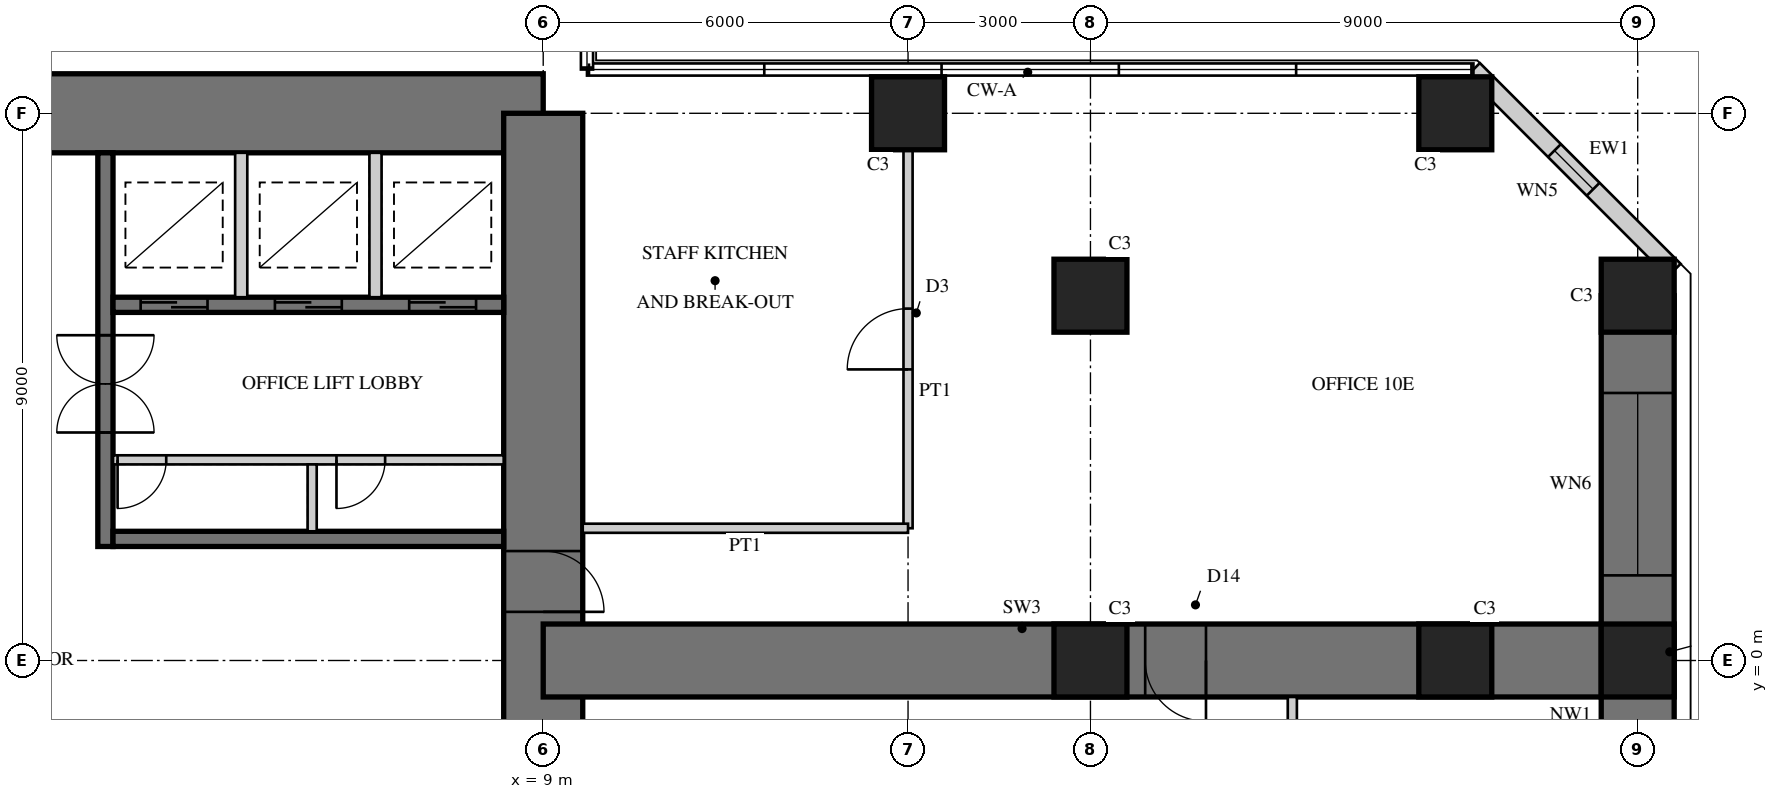
"""IFC4 building model, lengths in metres.
Left out: names, types, materials, properties, quantities, classifications, styles, units other than length and angle.
Written with IfcOpenShell. Run it as: python <this file> out.ifc"""

import sys

from ifc_helpers import new_model, si_unit, direction, frame, frame_2d, origin, origin_2d, place, context, subcontext, project, spatial, rectangle, hollow_rectangle, extrude, element, fill, save


model = new_model("IFC4")
c1 = context("Model", 3, precision=1e-05, world=origin(), true_north=direction((0.0, 1.0)))
c2 = subcontext(c1, "Body", "Model", "MODEL_VIEW")
j1 = project(units=[si_unit("LENGTHUNIT", "METRE"), si_unit("PLANEANGLEUNIT", "RADIAN")], contexts=[c1])
p1 = place(None, origin())
s1 = spatial("IfcSite", under=j1, at=p1, CompositionType="ELEMENT")
p2 = place(p1, origin())
s2 = spatial("IfcBuilding", under=s1, at=p2, CompositionType="ELEMENT")
p3 = place(p2, frame((0.0, 0.0, 43.5)))
s3 = spatial("IfcBuildingStorey", under=s2, at=p3, CompositionType="ELEMENT", Elevation=43.5)
p4 = place(p3, frame((9.0, 9.0, 0.0), z_axis=(0.0, 0.0, 1.0), x_axis=(-1.0, 0.0, 0.0)))
e1 = element("IfcWall", 1, at=p4, inside=s3, PredefinedType="SHEAR", context=c2, shape_type="SweptSolid", body=[
    extrude(rectangle(XDim=18.0, YDim=1.3, at=frame_2d((9.0, 0.0))), origin(), (0.0, 0.0, 1.0), 4.0),
])
p5 = place(p4, frame((9.8, 0.0, 0.0)))
e2 = element("IfcOpeningElement", 2, at=p5, cuts=e1, PredefinedType="OPENING", context=c2, shape_type="SweptSolid", body=[
    extrude(rectangle(XDim=1.0, YDim=2.4, at=frame_2d((0.5, 1.2))), frame((0.0, 0.66, 0.0), z_axis=(0.0, -1.0, 0.0), x_axis=(1.0, 0.0, 0.0)), (0.0, 0.0, 1.0), 1.32),
])
p6 = place(p3, frame((9.0, -9.0, 0.0), z_axis=(0.0, 0.0, 1.0), x_axis=(0.0, 1.0, 0.0)))
e3 = element("IfcWall", 3, at=p6, inside=s3, PredefinedType="SHEAR", context=c2, shape_type="SweptSolid", body=[
    extrude(rectangle(XDim=18.0, YDim=1.3, at=frame_2d((9.0, 0.0))), origin(), (0.0, 0.0, 1.0), 4.0),
])
p7 = place(p6, frame((9.8, 0.0, 0.0)))
e4 = element("IfcOpeningElement", 4, at=p7, cuts=e3, PredefinedType="OPENING", context=c2, shape_type="SweptSolid", body=[
    extrude(rectangle(XDim=1.0, YDim=2.4, at=frame_2d((0.5, 1.2))), frame((0.0, 0.66, 0.0), z_axis=(0.0, -1.0, 0.0), x_axis=(1.0, 0.0, 0.0)), (0.0, 0.0, 1.0), 1.32),
])
p8 = place(p3, frame((1.8, 1.875, 0.0), z_axis=(0.0, 0.0, 1.0), x_axis=(0.0, 1.0, 0.0)))
e5 = element("IfcWall", 5, at=p8, inside=s3, PredefinedType="SHEAR", context=c2, shape_type="SweptSolid", body=[
    extrude(rectangle(XDim=6.475, YDim=0.25, at=frame_2d((3.238, 0.0))), origin(), (0.0, 0.0, 1.0), 4.0),
])
p9 = place(p8, frame((1.875, 0.0, 0.0)))
e6 = element("IfcOpeningElement", 6, at=p9, cuts=e5, PredefinedType="OPENING", context=c2, shape_type="SweptSolid", body=[
    extrude(rectangle(XDim=1.6, YDim=2.4, at=frame_2d((0.8, 1.2))), frame((0.0, 0.135, 0.0), z_axis=(0.0, -1.0, 0.0), x_axis=(1.0, 0.0, 0.0)), (0.0, 0.0, 1.0), 0.27),
])
p10 = place(p3, frame((1.925, 2.0, 0.0), z_axis=(0.0, 0.0, 1.0), x_axis=(1.0, 0.0, 0.0)))
e7 = element("IfcWall", 7, at=p10, inside=s3, PredefinedType="SHEAR", context=c2, shape_type="SweptSolid", body=[
    extrude(rectangle(XDim=6.425, YDim=0.25, at=frame_2d((3.212, 0.0))), origin(), (0.0, 0.0, 1.0), 4.0),
])
p11 = place(p3, frame((1.925, 5.85, 0.0), z_axis=(0.0, 0.0, 1.0), x_axis=(1.0, 0.0, 0.0)))
e8 = element("IfcWall", 8, at=p11, inside=s3, PredefinedType="SHEAR", context=c2, shape_type="SweptSolid", body=[
    extrude(rectangle(XDim=6.425, YDim=0.25, at=frame_2d((3.212, 0.0))), origin(), (0.0, 0.0, 1.0), 4.0),
])
p12 = place(p11, frame((0.454, 0.0, 0.0)))
e9 = element("IfcOpeningElement", 9, at=p12, cuts=e8, PredefinedType="OPENING", context=c2, shape_type="SweptSolid", body=[
    extrude(rectangle(XDim=1.1, YDim=2.2, at=frame_2d((0.55, 1.1))), frame((0.0, 0.135, 0.0), z_axis=(0.0, -1.0, 0.0), x_axis=(1.0, 0.0, 0.0)), (0.0, 0.0, 1.0), 0.27),
])
p13 = place(p11, frame((2.663, 0.0, 0.0)))
e10 = element("IfcOpeningElement", 10, at=p13, cuts=e8, PredefinedType="OPENING", context=c2, shape_type="SweptSolid", body=[
    extrude(rectangle(XDim=1.1, YDim=2.2, at=frame_2d((0.55, 1.1))), frame((0.0, 0.135, 0.0), z_axis=(0.0, -1.0, 0.0), x_axis=(1.0, 0.0, 0.0)), (0.0, 0.0, 1.0), 0.27),
])
p14 = place(p11, frame((4.871, 0.0, 0.0)))
e11 = element("IfcOpeningElement", 11, at=p14, cuts=e8, PredefinedType="OPENING", context=c2, shape_type="SweptSolid", body=[
    extrude(rectangle(XDim=1.1, YDim=2.2, at=frame_2d((0.55, 1.1))), frame((0.0, 0.135, 0.0), z_axis=(0.0, -1.0, 0.0), x_axis=(1.0, 0.0, 0.0)), (0.0, 0.0, 1.0), 0.27),
])
p15 = place(p3, frame((1.925, 3.3, 0.0), z_axis=(0.0, 0.0, 1.0), x_axis=(1.0, 0.0, 0.0)))
e12 = element("IfcWall", 12, at=p15, inside=s3, PredefinedType="PARTITIONING", context=c2, shape_type="SweptSolid", body=[
    extrude(rectangle(XDim=6.425, YDim=0.15, at=frame_2d((3.212, 0.0))), origin(), (0.0, 0.0, 1.0), 4.0),
])
p16 = place(p15, frame((0.075, 0.0, 0.0)))
e13 = element("IfcOpeningElement", 13, at=p16, cuts=e12, PredefinedType="OPENING", context=c2, shape_type="SweptSolid", body=[
    extrude(rectangle(XDim=0.8, YDim=2.1, at=frame_2d((0.4, 1.05))), frame((0.0, 0.085, 0.0), z_axis=(0.0, -1.0, 0.0), x_axis=(1.0, 0.0, 0.0)), (0.0, 0.0, 1.0), 0.17),
])
p17 = place(p15, frame((3.675, 0.0, 0.0)))
e14 = element("IfcOpeningElement", 14, at=p17, cuts=e12, PredefinedType="OPENING", context=c2, shape_type="SweptSolid", body=[
    extrude(rectangle(XDim=0.8, YDim=2.1, at=frame_2d((0.4, 1.05))), frame((0.0, 0.085, 0.0), z_axis=(0.0, -1.0, 0.0), x_axis=(1.0, 0.0, 0.0)), (0.0, 0.0, 1.0), 0.17),
])
p18 = place(p3, frame((5.2, 2.125, 0.0), z_axis=(0.0, 0.0, 1.0), x_axis=(0.0, 1.0, 0.0)))
e15 = element("IfcWall", 15, at=p18, inside=s3, PredefinedType="PARTITIONING", context=c2, shape_type="SweptSolid", body=[
    extrude(rectangle(XDim=1.1, YDim=0.15, at=frame_2d((0.55, 0.0))), origin(), (0.0, 0.0, 1.0), 4.0),
])
for number, where, z_axis, x_axis in (
    (16, (4.033, 5.975, 0.0), (0.0, 0.0, 1.0), (0.0, 1.0, 0.0)),
    (17, (6.242, 5.975, 0.0), (0.0, 0.0, 1.0), (0.0, 1.0, 0.0)),
):
    element("IfcWall", number, at=place(p3, frame(where, z_axis=z_axis, x_axis=x_axis)), inside=s3, PredefinedType="PARTITIONING", context=c2, shape_type="SweptSolid", body=[
        extrude(rectangle(XDim=2.375, YDim=0.2, at=frame_2d((1.188, 0.0))), origin(), (0.0, 0.0, 1.0), 4.0),
    ])
p19 = place(p3, frame((9.0, 0.0, 0.0), z_axis=(0.0, 0.0, 1.0), x_axis=(1.0, 0.0, 0.0)))
e18 = element("IfcWall", 18, at=p19, inside=s3, PredefinedType="SHEAR", context=c2, shape_type="SweptSolid", body=[
    extrude(rectangle(XDim=18.0, YDim=1.2, at=frame_2d((9.0, 0.0))), origin(), (0.0, 0.0, 1.0), 4.0),
])
p20 = place(p19, frame((9.9, 0.0, 0.0)))
e19 = element("IfcOpeningElement", 19, at=p20, cuts=e18, PredefinedType="OPENING", context=c2, shape_type="SweptSolid", body=[
    extrude(rectangle(XDim=1.0, YDim=2.2, at=frame_2d((0.5, 1.1))), frame((0.0, 0.61, 0.0), z_axis=(0.0, -1.0, 0.0), x_axis=(1.0, 0.0, 0.0)), (0.0, 0.0, 1.0), 1.22),
])
p21 = place(p3, frame((27.0, -6.0, 0.0), z_axis=(0.0, 0.0, 1.0), x_axis=(0.0, 1.0, 0.0)))
e20 = element("IfcWall", 20, at=p21, inside=s3, PredefinedType="SHEAR", context=c2, shape_type="SweptSolid", body=[
    extrude(rectangle(XDim=12.0, YDim=1.2, at=frame_2d((6.0, 0.0))), origin(), (0.0, 0.0, 1.0), 4.0),
])
p22 = place(p21, frame((1.6, 0.0, 0.6)))
e21 = element("IfcOpeningElement", 21, at=p22, cuts=e20, PredefinedType="OPENING", context=c2, shape_type="SweptSolid", body=[
    extrude(rectangle(XDim=3.0, YDim=2.4, at=frame_2d((1.5, 1.2))), frame((0.0, 0.61, 0.0), z_axis=(0.0, -1.0, 0.0), x_axis=(1.0, 0.0, 0.0)), (0.0, 0.0, 1.0), 1.22),
])
p23 = place(p21, frame((7.4, 0.0, 0.6)))
e22 = element("IfcOpeningElement", 22, at=p23, cuts=e20, PredefinedType="OPENING", context=c2, shape_type="SweptSolid", body=[
    extrude(rectangle(XDim=3.0, YDim=2.4, at=frame_2d((1.5, 1.2))), frame((0.0, 0.61, 0.0), z_axis=(0.0, -1.0, 0.0), x_axis=(1.0, 0.0, 0.0)), (0.0, 0.0, 1.0), 1.22),
])
for number, where, z_axis, x_axis in (
    (23, (15.0, 9.0, 0.0), (0.0, 0.0, 1.0), (1.0, 0.0, 0.0)),
    (24, (24.0, 9.0, 0.0), (0.0, 0.0, 1.0), (1.0, 0.0, 0.0)),
    (25, (27.0, 0.0, 0.0), (0.0, 0.0, 1.0), (1.0, 0.0, 0.0)),
    (26, (27.0, 6.0, 0.0), (0.0, 0.0, 1.0), (1.0, 0.0, 0.0)),
    (27, (18.0, 0.0, 0.0), (0.0, 0.0, 1.0), (1.0, 0.0, 0.0)),
    (28, (18.0, 6.0, 0.0), (0.0, 0.0, 1.0), (1.0, 0.0, 0.0)),
    (29, (24.0, 0.0, 0.0), (0.0, 0.0, 1.0), (1.0, 0.0, 0.0)),
):
    element("IfcColumn", number, at=place(p3, frame(where, z_axis=z_axis, x_axis=x_axis)), inside=s3, PredefinedType="COLUMN", context=c2, shape_type="SweptSolid", body=[
        extrude(rectangle(XDim=1.2, YDim=1.2, at=origin_2d()), origin(), (0.0, 0.0, 1.0), 4.0),
    ])
p24 = place(p3, frame((27.6, 6.418, 0.0), z_axis=(0.0, 0.0, 1.0), x_axis=(-0.707106781187, 0.707106781187, 0.0)))
e30 = element("IfcWall", 30, at=p24, inside=s3, PredefinedType="SOLIDWALL", context=c2, shape_type="SweptSolid", body=[
    extrude(rectangle(XDim=4.669, YDim=0.3, at=frame_2d((2.335, 0.0))), origin(), (0.0, 0.0, 1.0), 3.8),
])
p25 = place(p24, frame((1.885, 0.0, 0.3)))
e31 = element("IfcOpeningElement", 31, at=p25, cuts=e30, PredefinedType="OPENING", context=c2, shape_type="SweptSolid", body=[
    extrude(rectangle(XDim=0.9, YDim=2.4, at=frame_2d((0.45, 1.2))), frame((0.0, 0.16, 0.0), z_axis=(0.0, -1.0, 0.0), x_axis=(1.0, 0.0, 0.0)), (0.0, 0.0, 1.0), 0.32),
])
p26 = place(p3, frame((15.0, 2.175, 0.0), z_axis=(0.0, 0.0, 1.0), x_axis=(0.0, 1.0, 0.0)))
e32 = element("IfcWall", 32, at=p26, inside=s3, PredefinedType="PARTITIONING", context=c2, shape_type="SweptSolid", body=[
    extrude(rectangle(XDim=6.225, YDim=0.15, at=frame_2d((3.112, 0.0))), origin(), (0.0, 0.0, 1.0), 2.95),
])
p27 = place(p26, frame((2.613, 0.0, 0.0)))
e33 = element("IfcOpeningElement", 33, at=p27, cuts=e32, PredefinedType="OPENING", context=c2, shape_type="SweptSolid", body=[
    extrude(rectangle(XDim=1.0, YDim=2.1, at=frame_2d((0.5, 1.05))), frame((0.0, 0.085, 0.0), z_axis=(0.0, -1.0, 0.0), x_axis=(1.0, 0.0, 0.0)), (0.0, 0.0, 1.0), 0.17),
])
p28 = place(p3, frame((9.65, 2.175, 0.0), z_axis=(0.0, 0.0, 1.0), x_axis=(1.0, 0.0, 0.0)))
e34 = element("IfcWall", 34, at=p28, inside=s3, PredefinedType="PARTITIONING", context=c2, shape_type="SweptSolid", body=[
    extrude(rectangle(XDim=5.35, YDim=0.15, at=frame_2d((2.675, 0.0))), origin(), (0.0, 0.0, 1.0), 3.8),
])
p29 = place(p3, frame((21.32, -9.68, 0.0), z_axis=(0.0, 0.0, 1.0), x_axis=(0.0, 1.0, 0.0)))
e35 = element("IfcWall", 35, at=p29, inside=s3, PredefinedType="PARTITIONING", context=c2, shape_type="SweptSolid", body=[
    extrude(rectangle(XDim=9.08, YDim=0.15, at=frame_2d((4.54, 0.0))), origin(), (0.0, 0.0, 1.0), 3.8),
])
p30 = place(p29, frame((7.63, 0.0, 0.0)))
e36 = element("IfcOpeningElement", 36, at=p30, cuts=e35, PredefinedType="OPENING", context=c2, shape_type="SweptSolid", body=[
    extrude(rectangle(XDim=1.0, YDim=2.2, at=frame_2d((0.5, 1.1))), frame((0.0, 0.085, 0.0), z_axis=(0.0, -1.0, 0.0), x_axis=(1.0, 0.0, 0.0)), (0.0, 0.0, 1.0), 0.17),
])
p31 = place(p23, origin())
e37 = element("IfcWindow", 37, at=p31, inside=s3, PartitioningType="SINGLE_PANEL", PredefinedType="WINDOW", context=c2, shape_type="SweptSolid", body=[
    extrude(hollow_rectangle(XDim=3.0, YDim=2.4, WallThickness=0.06, at=frame_2d((1.5, 1.2))), frame((0.0, 0.03, 0.0), z_axis=(0.0, -1.0, 0.0), x_axis=(1.0, 0.0, 0.0)), (0.0, 0.0, 1.0), 0.06),
    extrude(rectangle(XDim=2.879, YDim=2.279, at=frame_2d((1.5, 1.2))), frame((0.0, 0.03, 0.0), z_axis=(0.0, -1.0, 0.0), x_axis=(1.0, 0.0, 0.0)), (0.0, 0.0, 1.0), 0.06),
])
fill(e22, e37)
p32 = place(p25, origin())
e38 = element("IfcWindow", 38, at=p32, inside=s3, PartitioningType="SINGLE_PANEL", PredefinedType="WINDOW", context=c2, shape_type="SweptSolid", body=[
    extrude(hollow_rectangle(XDim=0.9, YDim=2.4, WallThickness=0.06, at=frame_2d((0.45, 1.2))), frame((0.0, 0.03, 0.0), z_axis=(0.0, -1.0, 0.0), x_axis=(1.0, 0.0, 0.0)), (0.0, 0.0, 1.0), 0.06),
    extrude(rectangle(XDim=0.779, YDim=2.279, at=frame_2d((0.45, 1.2))), frame((0.0, 0.03, 0.0), z_axis=(0.0, -1.0, 0.0), x_axis=(1.0, 0.0, 0.0)), (0.0, 0.0, 1.0), 0.06),
])
fill(e31, e38)
p33 = place(p27, origin())
e39 = element("IfcDoor", 39, at=p33, inside=s3, OperationType="SINGLE_SWING_LEFT", PredefinedType="DOOR", context=c2, shape_type="SweptSolid", body=[
    extrude(rectangle(XDim=1.0, YDim=2.1, at=frame_2d((0.5, 1.05))), frame((0.0, 0.025, 0.0), z_axis=(0.0, -1.0, 0.0), x_axis=(1.0, 0.0, 0.0)), (0.0, 0.0, 1.0), 0.05),
])
fill(e33, e39)
p34 = place(p20, frame((1.0, 0.0, 0.0), z_axis=(0.0, 0.0, 1.0), x_axis=(-1.0, 0.0, 0.0)))
e40 = element("IfcDoor", 40, at=p34, inside=s3, OperationType="SINGLE_SWING_LEFT", PredefinedType="DOOR", context=c2, shape_type="SweptSolid", body=[
    extrude(rectangle(XDim=1.0, YDim=2.2, at=frame_2d((0.5, 1.1))), frame((0.0, 0.025, 0.0), z_axis=(0.0, -1.0, 0.0), x_axis=(1.0, 0.0, 0.0)), (0.0, 0.0, 1.0), 0.05),
])
fill(e19, e40)
p35 = place(p7, frame((1.0, 0.0, 0.0), z_axis=(0.0, 0.0, 1.0), x_axis=(-1.0, 0.0, 0.0)))
e41 = element("IfcDoor", 41, at=p35, inside=s3, OperationType="SINGLE_SWING_RIGHT", PredefinedType="DOOR", context=c2, shape_type="SweptSolid", body=[
    extrude(rectangle(XDim=1.0, YDim=2.4, at=frame_2d((0.5, 1.2))), frame((0.0, -0.005, 0.0), z_axis=(0.0, -1.0, 0.0), x_axis=(1.0, 0.0, 0.0)), (0.0, 0.0, 1.0), 0.05),
])
fill(e4, e41)
p36 = place(p12, origin())
e42 = element("IfcDoor", 42, at=p36, inside=s3, OperationType="DOUBLE_DOOR_SLIDING", PredefinedType="DOOR", context=c2, shape_type="SweptSolid", body=[
    extrude(rectangle(XDim=1.1, YDim=2.2, at=frame_2d((0.55, 1.1))), frame((0.0, 0.025, 0.0), z_axis=(0.0, -1.0, 0.0), x_axis=(1.0, 0.0, 0.0)), (0.0, 0.0, 1.0), 0.05),
])
fill(e9, e42)
p37 = place(p13, origin())
e43 = element("IfcDoor", 43, at=p37, inside=s3, OperationType="DOUBLE_DOOR_SLIDING", PredefinedType="DOOR", context=c2, shape_type="SweptSolid", body=[
    extrude(rectangle(XDim=1.1, YDim=2.2, at=frame_2d((0.55, 1.1))), frame((0.0, 0.025, 0.0), z_axis=(0.0, -1.0, 0.0), x_axis=(1.0, 0.0, 0.0)), (0.0, 0.0, 1.0), 0.05),
])
fill(e10, e43)
p38 = place(p14, origin())
e44 = element("IfcDoor", 44, at=p38, inside=s3, OperationType="DOUBLE_DOOR_SLIDING", PredefinedType="DOOR", context=c2, shape_type="SweptSolid", body=[
    extrude(rectangle(XDim=1.1, YDim=2.2, at=frame_2d((0.55, 1.1))), frame((0.0, 0.025, 0.0), z_axis=(0.0, -1.0, 0.0), x_axis=(1.0, 0.0, 0.0)), (0.0, 0.0, 1.0), 0.05),
])
fill(e11, e44)
p39 = place(p9, origin())
e45 = element("IfcDoor", 45, at=p39, inside=s3, OperationType="DOUBLE_DOOR_DOUBLE_SWING", PredefinedType="DOOR", context=c2, shape_type="SweptSolid", body=[
    extrude(rectangle(XDim=1.6, YDim=2.4, at=frame_2d((0.8, 1.2))), frame((0.0, 0.025, 0.0), z_axis=(0.0, -1.0, 0.0), x_axis=(1.0, 0.0, 0.0)), (0.0, 0.0, 1.0), 0.05),
])
fill(e6, e45)
p40 = place(p16, frame((0.8, 0.0, 0.0), z_axis=(0.0, 0.0, 1.0), x_axis=(-1.0, 0.0, 0.0)))
e46 = element("IfcDoor", 46, at=p40, inside=s3, OperationType="SINGLE_SWING_RIGHT", PredefinedType="DOOR", context=c2, shape_type="SweptSolid", body=[
    extrude(rectangle(XDim=0.8, YDim=2.1, at=frame_2d((0.4, 1.05))), frame((0.0, 0.025, 0.0), z_axis=(0.0, -1.0, 0.0), x_axis=(1.0, 0.0, 0.0)), (0.0, 0.0, 1.0), 0.05),
])
fill(e13, e46)
p41 = place(p17, frame((0.8, 0.0, 0.0), z_axis=(0.0, 0.0, 1.0), x_axis=(-1.0, 0.0, 0.0)))
e47 = element("IfcDoor", 47, at=p41, inside=s3, OperationType="SINGLE_SWING_RIGHT", PredefinedType="DOOR", context=c2, shape_type="SweptSolid", body=[
    extrude(rectangle(XDim=0.8, YDim=2.1, at=frame_2d((0.4, 1.05))), frame((0.0, 0.025, 0.0), z_axis=(0.0, -1.0, 0.0), x_axis=(1.0, 0.0, 0.0)), (0.0, 0.0, 1.0), 0.05),
])
fill(e14, e47)
save(model, sys.argv[1])
